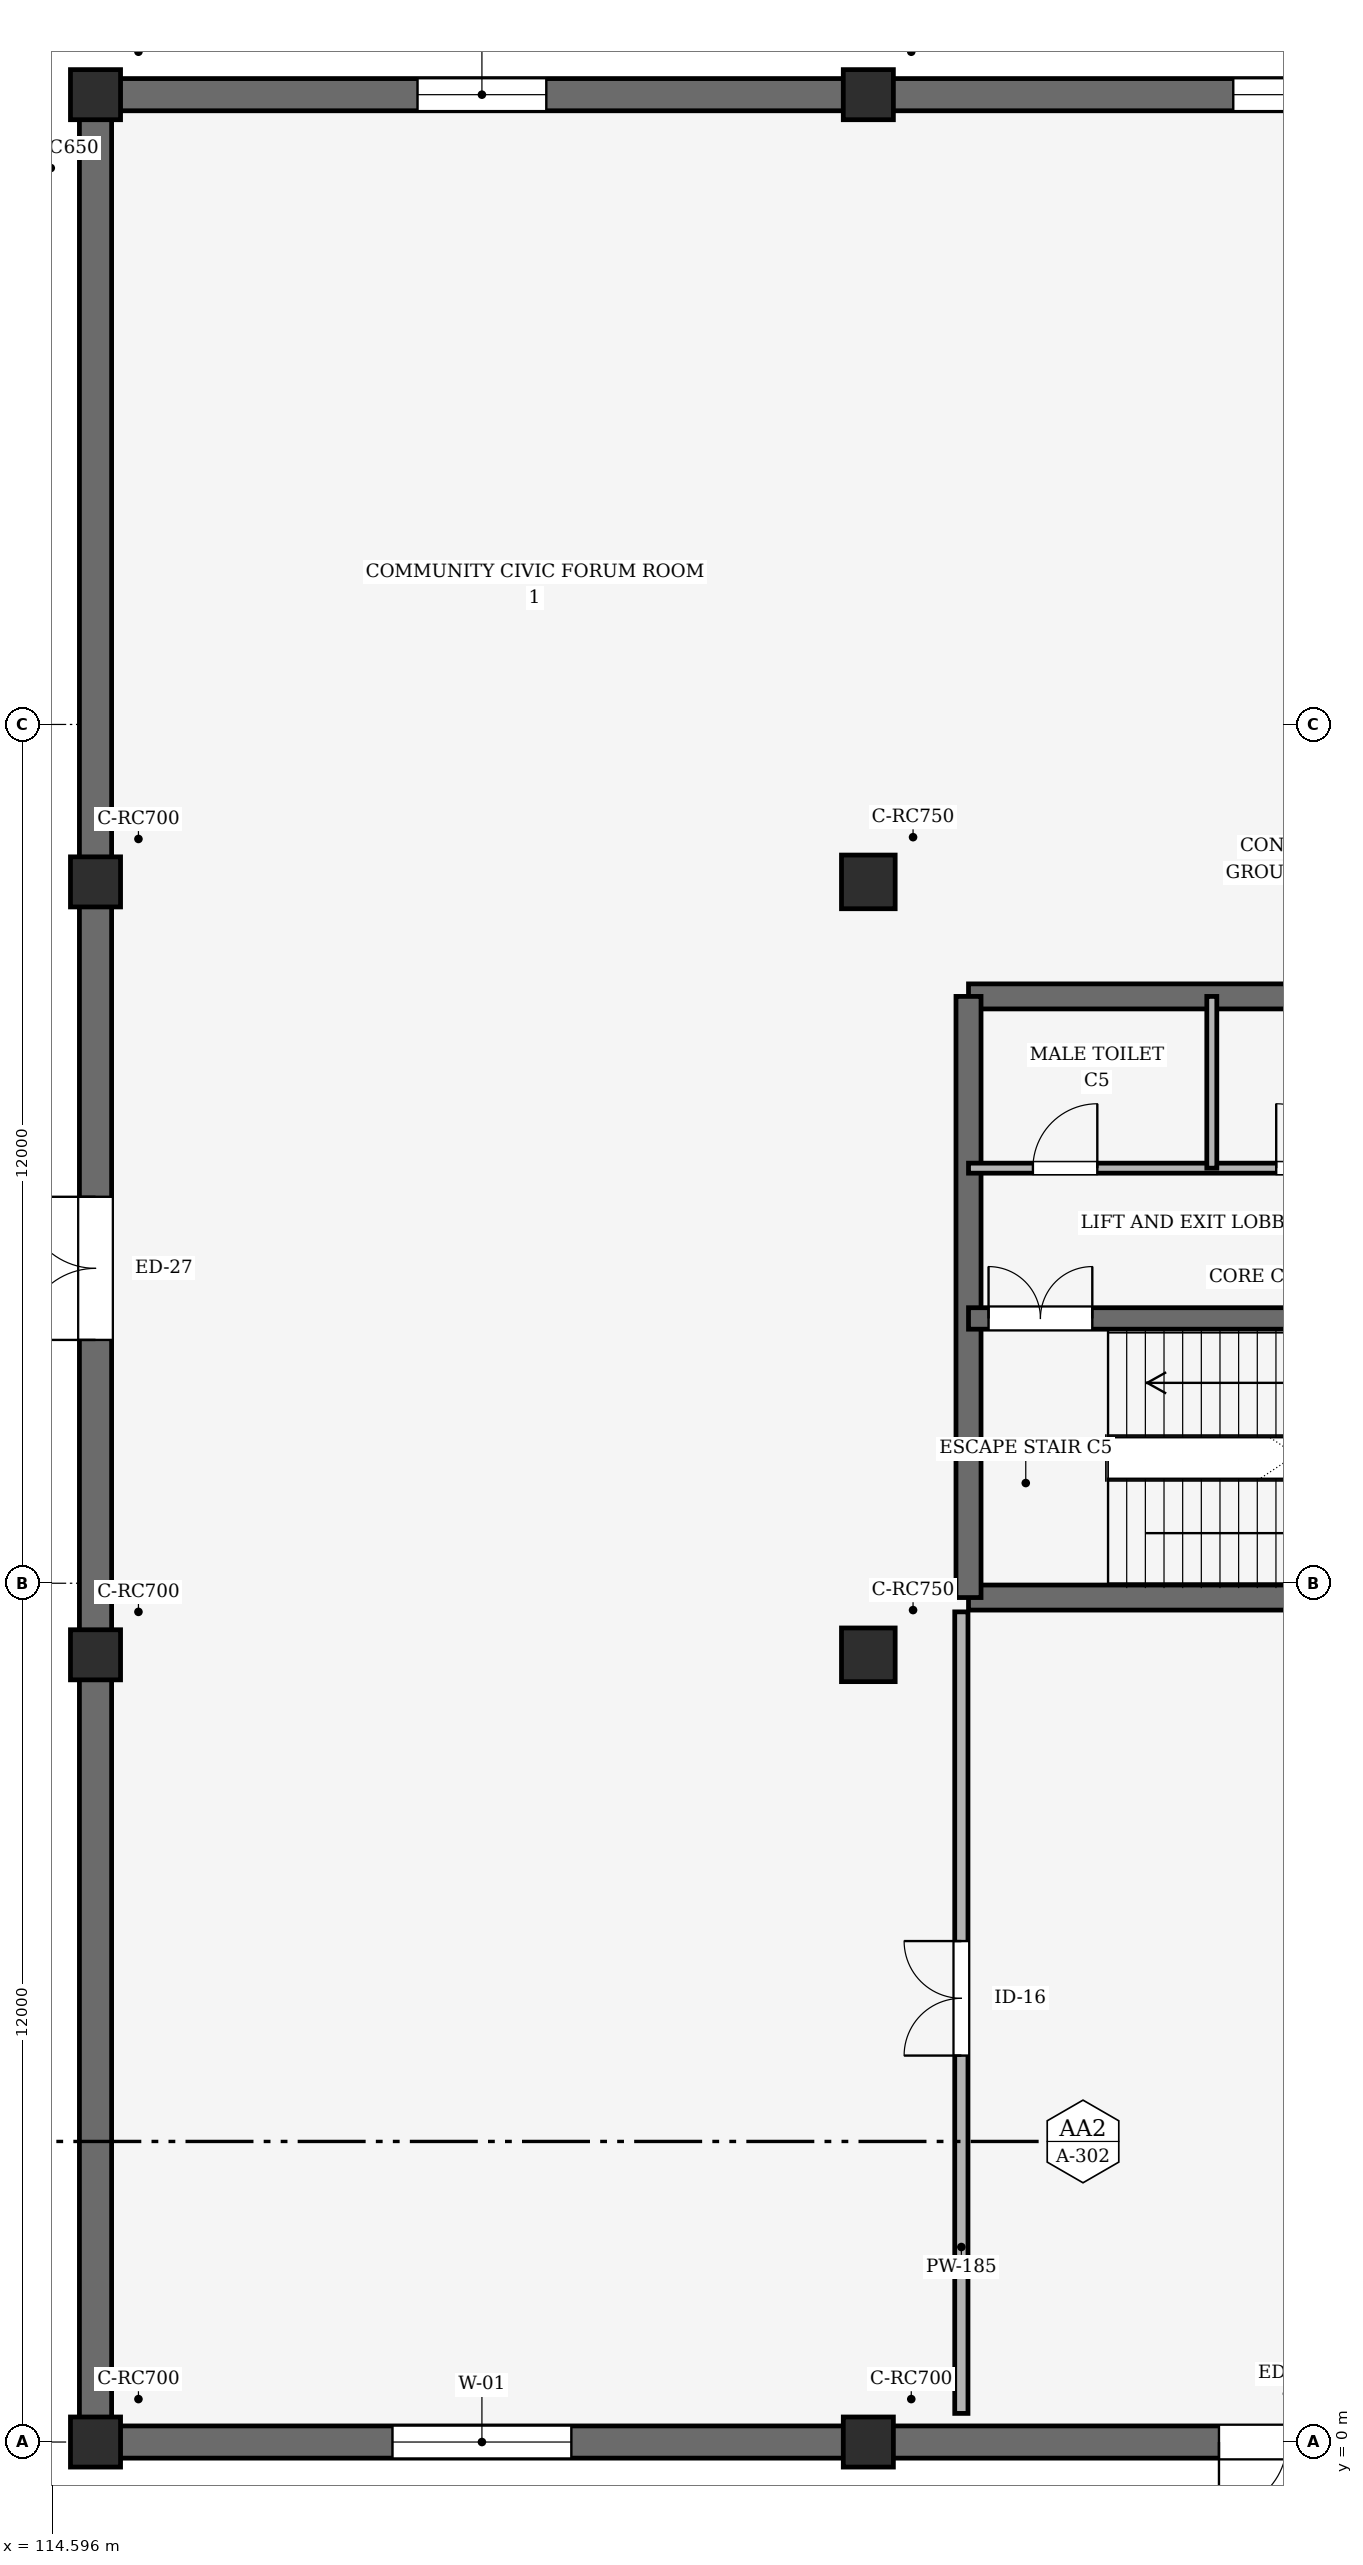
"""IFC4 building model, lengths in metres.
Left out: names, types, materials, properties, quantities, classifications, styles, units other than length and angle.
Written with IfcOpenShell. Run it as: python <this file> out.ifc"""

import sys

from ifc_helpers import new_model, si_unit, direction, frame, frame_2d, origin, origin_2d, place, context, subcontext, project, spatial, rectangle, extrude, element, fill, save


model = new_model("IFC4")
c1 = context("Model", 3, precision=1e-05, world=origin(), true_north=direction((0.0, 1.0)))
c2 = subcontext(c1, "Body", "Model", "MODEL_VIEW")
j1 = project(units=[si_unit("LENGTHUNIT", "METRE"), si_unit("PLANEANGLEUNIT", "RADIAN")], contexts=[c1])
p1 = place(None, origin())
s1 = spatial("IfcSite", under=j1, at=p1, CompositionType="ELEMENT")
p2 = place(p1, origin())
s2 = spatial("IfcBuilding", under=s1, at=p2, CompositionType="ELEMENT")
p3 = place(p2, origin())
s3 = spatial("IfcBuildingStorey", under=s2, at=p3, CompositionType="ELEMENT", Elevation=0.0)
for number, where, z_axis, x_axis in (
    (1, (115.2, 0.0, 0.0), (0.0, 0.0, 1.0), (1.0, 0.0, 0.0)),
    (2, (115.2, 11.0, 0.0), (0.0, 0.0, 1.0), (1.0, 0.0, 0.0)),
    (3, (115.2, 21.8, 0.0), (0.0, 0.0, 1.0), (1.0, 0.0, 0.0)),
    (4, (115.2, 32.8, 0.0), (0.0, 0.0, 1.0), (1.0, 0.0, 0.0)),
    (5, (126.0, 0.0, 0.0), (0.0, 0.0, 1.0), (1.0, 0.0, 0.0)),
):
    element("IfcColumn", number, at=place(p3, frame(where, z_axis=z_axis, x_axis=x_axis)), inside=s3, PredefinedType="COLUMN", context=c2, shape_type="SweptSolid", body=[
        extrude(rectangle(XDim=0.7, YDim=0.7, at=origin_2d()), origin(), (0.0, 0.0, 1.0), 5.4),
    ])
for number, where, z_axis, x_axis in (
    (6, (126.0, 11.0, 0.0), (0.0, 0.0, 1.0), (1.0, 0.0, 0.0)),
    (7, (126.0, 21.8, 0.0), (0.0, 0.0, 1.0), (1.0, 0.0, 0.0)),
):
    element("IfcColumn", number, at=place(p3, frame(where, z_axis=z_axis, x_axis=x_axis)), inside=s3, PredefinedType="COLUMN", context=c2, shape_type="SweptSolid", body=[
        extrude(rectangle(XDim=0.75, YDim=0.75, at=origin_2d()), origin(), (0.0, 0.0, 1.0), 5.4),
    ])
p4 = place(p3, frame((126.0, 32.8, 0.0), z_axis=(0.0, 0.0, 1.0), x_axis=(1.0, 0.0, 0.0)))
e8 = element("IfcColumn", 8, at=p4, inside=s3, PredefinedType="COLUMN", context=c2, shape_type="SweptSolid", body=[
    extrude(rectangle(XDim=0.7, YDim=0.7, at=origin_2d()), origin(), (0.0, 0.0, 1.0), 5.4),
])
p5 = place(p3, frame((115.2, 0.0, 0.0), z_axis=(0.0, 0.0, 1.0), x_axis=(1.0, 0.0, 0.0)))
e9 = element("IfcWall", 9, at=p5, inside=s3, PredefinedType="SOLIDWALL", context=c2, shape_type="SweptSolid", body=[
    extrude(rectangle(XDim=10.8, YDim=0.45, at=frame_2d((5.4, 0.0))), origin(), (0.0, 0.0, 1.0), 4.3),
])
p6 = place(p5, frame((4.15, 0.0, 0.85)))
e10 = element("IfcOpeningElement", 10, at=p6, cuts=e9, PredefinedType="OPENING", context=c2, shape_type="SweptSolid", body=[
    extrude(rectangle(XDim=2.5, YDim=3.2, at=frame_2d((1.25, 1.6))), frame((0.0, 0.235, 0.0), z_axis=(0.0, -1.0, 0.0), x_axis=(1.0, 0.0, 0.0)), (0.0, 0.0, 1.0), 0.47),
])
p7 = place(p3, frame((126.0, 32.8, 0.0), z_axis=(0.0, 0.0, 1.0), x_axis=(-1.0, 0.0, 0.0)))
e11 = element("IfcWall", 11, at=p7, inside=s3, PredefinedType="SOLIDWALL", context=c2, shape_type="SweptSolid", body=[
    extrude(rectangle(XDim=10.8, YDim=0.45, at=frame_2d((5.4, 0.0))), origin(), (0.0, 0.0, 1.0), 4.3),
])
p8 = place(p7, frame((4.5, 0.0, 0.95)))
e12 = element("IfcOpeningElement", 12, at=p8, cuts=e11, PredefinedType="OPENING", context=c2, shape_type="SweptSolid", body=[
    extrude(rectangle(XDim=1.8, YDim=2.6, at=frame_2d((0.9, 1.3))), frame((0.0, 0.235, 0.0), z_axis=(0.0, -1.0, 0.0), x_axis=(1.0, 0.0, 0.0)), (0.0, 0.0, 1.0), 0.47),
])
p9 = place(p3, frame((126.0, 0.0, 0.0), z_axis=(0.0, 0.0, 1.0), x_axis=(1.0, 0.0, 0.0)))
e13 = element("IfcWall", 13, at=p9, inside=s3, PredefinedType="SOLIDWALL", context=c2, shape_type="SweptSolid", body=[
    extrude(rectangle(XDim=12.0, YDim=0.45, at=frame_2d((6.0, 0.0))), origin(), (0.0, 0.0, 1.0), 4.3),
])
p10 = place(p9, frame((4.9, 0.0, 0.0)))
e14 = element("IfcOpeningElement", 14, at=p10, cuts=e13, PredefinedType="OPENING", context=c2, shape_type="SweptSolid", body=[
    extrude(rectangle(XDim=1.9, YDim=2.35, at=frame_2d((0.95, 1.175))), frame((0.0, 0.235, 0.0), z_axis=(0.0, -1.0, 0.0), x_axis=(1.0, 0.0, 0.0)), (0.0, 0.0, 1.0), 0.47),
])
p11 = place(p3, frame((138.0, 32.8, 0.0), z_axis=(0.0, 0.0, 1.0), x_axis=(-1.0, 0.0, 0.0)))
e15 = element("IfcWall", 15, at=p11, inside=s3, PredefinedType="SOLIDWALL", context=c2, shape_type="SweptSolid", body=[
    extrude(rectangle(XDim=12.0, YDim=0.45, at=frame_2d((6.0, 0.0))), origin(), (0.0, 0.0, 1.0), 4.3),
])
p12 = place(p11, frame((5.1, 0.0, 0.95)))
e16 = element("IfcOpeningElement", 16, at=p12, cuts=e15, PredefinedType="OPENING", context=c2, shape_type="SweptSolid", body=[
    extrude(rectangle(XDim=1.8, YDim=2.6, at=frame_2d((0.9, 1.3))), frame((0.0, 0.235, 0.0), z_axis=(0.0, -1.0, 0.0), x_axis=(1.0, 0.0, 0.0)), (0.0, 0.0, 1.0), 0.47),
])
p13 = place(p3, frame((115.2, 11.0, 0.0), z_axis=(0.0, 0.0, 1.0), x_axis=(0.0, -1.0, 0.0)))
e17 = element("IfcWall", 17, at=p13, inside=s3, PredefinedType="SOLIDWALL", context=c2, shape_type="SweptSolid", body=[
    extrude(rectangle(XDim=11.0, YDim=0.45, at=frame_2d((5.5, 0.0))), origin(), (0.0, 0.0, 1.0), 4.3),
])
p14 = place(p3, frame((115.2, 21.8, 0.0), z_axis=(0.0, 0.0, 1.0), x_axis=(0.0, -1.0, 0.0)))
e18 = element("IfcWall", 18, at=p14, inside=s3, PredefinedType="SOLIDWALL", context=c2, shape_type="SweptSolid", body=[
    extrude(rectangle(XDim=10.8, YDim=0.45, at=frame_2d((5.4, 0.0))), origin(), (0.0, 0.0, 1.0), 4.3),
])
p15 = place(p14, frame((4.4, 0.0, 0.0)))
e19 = element("IfcOpeningElement", 19, at=p15, cuts=e18, PredefinedType="OPENING", context=c2, shape_type="SweptSolid", body=[
    extrude(rectangle(XDim=2.0, YDim=2.4, at=frame_2d((1.0, 1.2))), frame((0.0, 0.235, 0.0), z_axis=(0.0, -1.0, 0.0), x_axis=(1.0, 0.0, 0.0)), (0.0, 0.0, 1.0), 0.47),
])
p16 = place(p3, frame((115.2, 32.8, 0.0), z_axis=(0.0, 0.0, 1.0), x_axis=(0.0, -1.0, 0.0)))
e20 = element("IfcWall", 20, at=p16, inside=s3, PredefinedType="SOLIDWALL", context=c2, shape_type="SweptSolid", body=[
    extrude(rectangle(XDim=11.0, YDim=0.45, at=frame_2d((5.5, 0.0))), origin(), (0.0, 0.0, 1.0), 4.3),
])
for number, where, z_axis, x_axis in (
    (21, (127.4, 11.8, 0.0), (0.0, 0.0, 1.0), (1.0, 0.0, 0.0)),
    (22, (137.6, 20.2, 0.0), (0.0, 0.0, 1.0), (-1.0, 0.0, 0.0)),
):
    element("IfcWall", number, at=place(p3, frame(where, z_axis=z_axis, x_axis=x_axis)), inside=s3, PredefinedType="SHEAR", context=c2, shape_type="SweptSolid", body=[
        extrude(rectangle(XDim=10.2, YDim=0.35, at=frame_2d((5.1, 0.0))), origin(), (0.0, 0.0, 1.0), 5.4),
    ])
p17 = place(p3, frame((127.4, 20.2, 0.0), z_axis=(0.0, 0.0, 1.0), x_axis=(0.0, -1.0, 0.0)))
e23 = element("IfcWall", 23, at=p17, inside=s3, PredefinedType="SHEAR", context=c2, shape_type="SweptSolid", body=[
    extrude(rectangle(XDim=8.4, YDim=0.35, at=frame_2d((4.2, 0.0))), origin(), (0.0, 0.0, 1.0), 5.4),
])
p18 = place(p3, frame((127.4, 15.7, 0.0), z_axis=(0.0, 0.0, 1.0), x_axis=(1.0, 0.0, 0.0)))
e24 = element("IfcWall", 24, at=p18, inside=s3, PredefinedType="SHEAR", context=c2, shape_type="SweptSolid", body=[
    extrude(rectangle(XDim=10.2, YDim=0.3, at=frame_2d((5.1, 0.0))), origin(), (0.0, 0.0, 1.0), 5.4),
])
p19 = place(p18, frame((0.28, 0.0, 0.0)))
e25 = element("IfcOpeningElement", 25, at=p19, cuts=e24, PredefinedType="OPENING", context=c2, shape_type="SweptSolid", body=[
    extrude(rectangle(XDim=1.45, YDim=2.15, at=frame_2d((0.725, 1.075))), frame((0.0, 0.16, 0.0), z_axis=(0.0, -1.0, 0.0), x_axis=(1.0, 0.0, 0.0)), (0.0, 0.0, 1.0), 0.32),
])
p20 = place(p18, frame((8.225, 0.0, 0.0)))
e26 = element("IfcOpeningElement", 26, at=p20, cuts=e24, PredefinedType="OPENING", context=c2, shape_type="SweptSolid", body=[
    extrude(rectangle(XDim=1.1, YDim=2.15, at=frame_2d((0.55, 1.075))), frame((0.0, 0.16, 0.0), z_axis=(0.0, -1.0, 0.0), x_axis=(1.0, 0.0, 0.0)), (0.0, 0.0, 1.0), 0.32),
])
p21 = place(p3, frame((127.4, 17.8, 0.0), z_axis=(0.0, 0.0, 1.0), x_axis=(1.0, 0.0, 0.0)))
e27 = element("IfcWall", 27, at=p21, inside=s3, PredefinedType="PARTITIONING", context=c2, shape_type="SweptSolid", body=[
    extrude(rectangle(XDim=10.2, YDim=0.14, at=frame_2d((5.1, 0.0))), origin(), (0.0, 0.0, 1.0), 4.5),
])
p22 = place(p21, frame((0.9, 0.0, 0.0)))
e28 = element("IfcOpeningElement", 28, at=p22, cuts=e27, PredefinedType="OPENING", context=c2, shape_type="SweptSolid", body=[
    extrude(rectangle(XDim=0.9, YDim=2.1, at=frame_2d((0.45, 1.05))), frame((0.0, 0.08, 0.0), z_axis=(0.0, -1.0, 0.0), x_axis=(1.0, 0.0, 0.0)), (0.0, 0.0, 1.0), 0.16),
])
p23 = place(p21, frame((4.3, 0.0, 0.0)))
e29 = element("IfcOpeningElement", 29, at=p23, cuts=e27, PredefinedType="OPENING", context=c2, shape_type="SweptSolid", body=[
    extrude(rectangle(XDim=0.9, YDim=2.1, at=frame_2d((0.45, 1.05))), frame((0.0, 0.08, 0.0), z_axis=(0.0, -1.0, 0.0), x_axis=(1.0, 0.0, 0.0)), (0.0, 0.0, 1.0), 0.16),
])
p24 = place(p21, frame((7.7, 0.0, 0.0)))
e30 = element("IfcOpeningElement", 30, at=p24, cuts=e27, PredefinedType="OPENING", context=c2, shape_type="SweptSolid", body=[
    extrude(rectangle(XDim=0.95, YDim=2.1, at=frame_2d((0.475, 1.05))), frame((0.0, 0.08, 0.0), z_axis=(0.0, -1.0, 0.0), x_axis=(1.0, 0.0, 0.0)), (0.0, 0.0, 1.0), 0.16),
])
p25 = place(p3, frame((130.8, 17.8, 0.0), z_axis=(0.0, 0.0, 1.0), x_axis=(0.0, 1.0, 0.0)))
e31 = element("IfcWall", 31, at=p25, inside=s3, PredefinedType="PARTITIONING", context=c2, shape_type="SweptSolid", body=[
    extrude(rectangle(XDim=2.4, YDim=0.14, at=frame_2d((1.2, 0.0))), origin(), (0.0, 0.0, 1.0), 4.5),
])
p26 = place(p3, frame((127.3, 0.4, 0.0), z_axis=(0.0, 0.0, 1.0), x_axis=(0.0, 1.0, 0.0)))
e32 = element("IfcWall", 32, at=p26, inside=s3, PredefinedType="PARTITIONING", context=c2, shape_type="SweptSolid", body=[
    extrude(rectangle(XDim=11.2, YDim=0.185, at=frame_2d((5.6, 0.0))), origin(), (0.0, 0.0, 1.0), 3.6),
])
p27 = place(p26, frame((5.0, 0.0, 0.0)))
e33 = element("IfcOpeningElement", 33, at=p27, cuts=e32, PredefinedType="OPENING", context=c2, shape_type="SweptSolid", body=[
    extrude(rectangle(XDim=1.6, YDim=2.2, at=frame_2d((0.8, 1.1))), frame((0.0, 0.103, 0.0), z_axis=(0.0, -1.0, 0.0), x_axis=(1.0, 0.0, 0.0)), (0.0, 0.0, 1.0), 0.205),
])
p28 = place(p6, origin())
e34 = element("IfcWindow", 34, at=p28, inside=s3, PartitioningType="DOUBLE_PANEL_VERTICAL", PredefinedType="WINDOW", context=c2, shape_type="SweptSolid", body=[
    extrude(rectangle(XDim=2.5, YDim=3.2, at=frame_2d((1.25, 1.6))), frame((0.0, 0.03, 0.0), z_axis=(0.0, -1.0, 0.0), x_axis=(1.0, 0.0, 0.0)), (0.0, 0.0, 1.0), 0.06),
])
fill(e10, e34)
p29 = place(p8, origin())
e35 = element("IfcWindow", 35, at=p29, inside=s3, PartitioningType="DOUBLE_PANEL_VERTICAL", PredefinedType="WINDOW", context=c2, shape_type="SweptSolid", body=[
    extrude(rectangle(XDim=1.8, YDim=2.6, at=frame_2d((0.9, 1.3))), frame((0.0, 0.03, 0.0), z_axis=(0.0, -1.0, 0.0), x_axis=(1.0, 0.0, 0.0)), (0.0, 0.0, 1.0), 0.06),
])
fill(e12, e35)
p30 = place(p10, frame((1.9, 0.0, 0.0), z_axis=(0.0, 0.0, 1.0), x_axis=(-1.0, 0.0, 0.0)))
e36 = element("IfcDoor", 36, at=p30, inside=s3, OperationType="DOUBLE_DOOR_SINGLE_SWING", PredefinedType="DOOR", context=c2, shape_type="SweptSolid", body=[
    extrude(rectangle(XDim=1.9, YDim=2.35, at=frame_2d((0.95, 1.175))), frame((0.0, 0.025, 0.0), z_axis=(0.0, -1.0, 0.0), x_axis=(1.0, 0.0, 0.0)), (0.0, 0.0, 1.0), 0.05),
])
fill(e14, e36)
p31 = place(p12, origin())
e37 = element("IfcWindow", 37, at=p31, inside=s3, PartitioningType="DOUBLE_PANEL_VERTICAL", PredefinedType="WINDOW", context=c2, shape_type="SweptSolid", body=[
    extrude(rectangle(XDim=1.8, YDim=2.6, at=frame_2d((0.9, 1.3))), frame((0.0, 0.03, 0.0), z_axis=(0.0, -1.0, 0.0), x_axis=(1.0, 0.0, 0.0)), (0.0, 0.0, 1.0), 0.06),
])
fill(e16, e37)
p32 = place(p15, frame((2.0, 0.0, 0.0), z_axis=(0.0, 0.0, 1.0), x_axis=(-1.0, 0.0, 0.0)))
e38 = element("IfcDoor", 38, at=p32, inside=s3, OperationType="DOUBLE_DOOR_SINGLE_SWING", PredefinedType="DOOR", context=c2, shape_type="SweptSolid", body=[
    extrude(rectangle(XDim=2.0, YDim=2.4, at=frame_2d((1.0, 1.2))), frame((0.0, 0.025, 0.0), z_axis=(0.0, -1.0, 0.0), x_axis=(1.0, 0.0, 0.0)), (0.0, 0.0, 1.0), 0.05),
])
fill(e19, e38)
p33 = place(p19, origin())
e39 = element("IfcDoor", 39, at=p33, inside=s3, OperationType="DOUBLE_DOOR_SINGLE_SWING", PredefinedType="DOOR", context=c2, shape_type="SweptSolid", body=[
    extrude(rectangle(XDim=1.45, YDim=2.15, at=frame_2d((0.725, 1.075))), frame((0.0, 0.025, 0.0), z_axis=(0.0, -1.0, 0.0), x_axis=(1.0, 0.0, 0.0)), (0.0, 0.0, 1.0), 0.05),
])
fill(e25, e39)
p34 = place(p22, origin())
e40 = element("IfcDoor", 40, at=p34, inside=s3, OperationType="SINGLE_SWING_RIGHT", PredefinedType="DOOR", context=c2, shape_type="SweptSolid", body=[
    extrude(rectangle(XDim=0.9, YDim=2.1, at=frame_2d((0.45, 1.05))), frame((0.0, 0.025, 0.0), z_axis=(0.0, -1.0, 0.0), x_axis=(1.0, 0.0, 0.0)), (0.0, 0.0, 1.0), 0.05),
])
fill(e28, e40)
p35 = place(p23, origin())
e41 = element("IfcDoor", 41, at=p35, inside=s3, OperationType="SINGLE_SWING_LEFT", PredefinedType="DOOR", context=c2, shape_type="SweptSolid", body=[
    extrude(rectangle(XDim=0.9, YDim=2.1, at=frame_2d((0.45, 1.05))), frame((0.0, 0.025, 0.0), z_axis=(0.0, -1.0, 0.0), x_axis=(1.0, 0.0, 0.0)), (0.0, 0.0, 1.0), 0.05),
])
fill(e29, e41)
p36 = place(p27, origin())
e42 = element("IfcDoor", 42, at=p36, inside=s3, OperationType="DOUBLE_DOOR_SINGLE_SWING", PredefinedType="DOOR", context=c2, shape_type="SweptSolid", body=[
    extrude(rectangle(XDim=1.6, YDim=2.2, at=frame_2d((0.8, 1.1))), frame((0.0, 0.025, 0.0), z_axis=(0.0, -1.0, 0.0), x_axis=(1.0, 0.0, 0.0)), (0.0, 0.0, 1.0), 0.05),
])
fill(e33, e42)
save(model, sys.argv[1])
